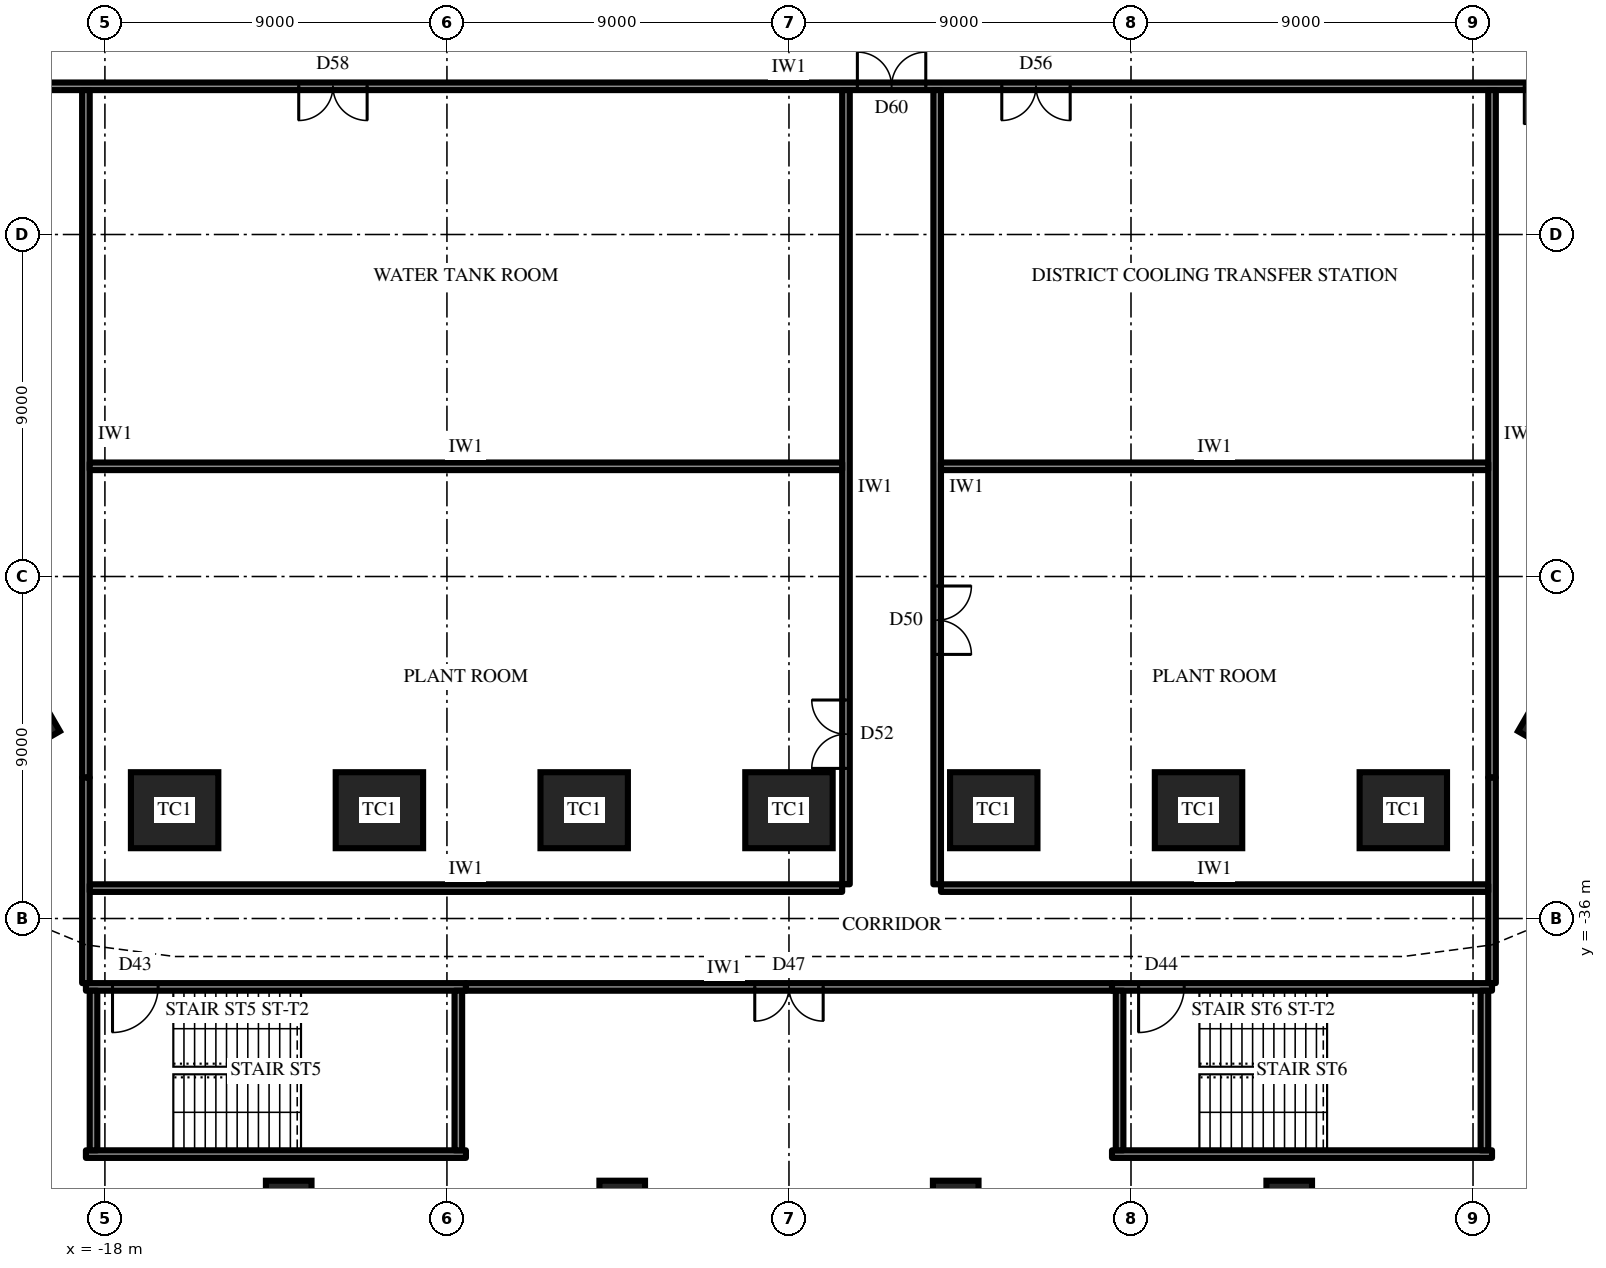
"""IFC4 building model, lengths in metres.
Left out: names, types, materials, properties, quantities, classifications, styles, units other than length and angle.
Written with IfcOpenShell. Run it as: python <this file> out.ifc"""

import sys

from ifc_helpers import new_model, si_unit, direction, frame, frame_2d, origin, origin_2d, place, context, subcontext, project, spatial, rectangle, extrude, element, fill, save


model = new_model("IFC4")
c1 = context("Model", 3, precision=1e-05, world=origin(), true_north=direction((0.0, 1.0)))
c2 = subcontext(c1, "Body", "Model", "MODEL_VIEW")
j1 = project(units=[si_unit("LENGTHUNIT", "METRE"), si_unit("PLANEANGLEUNIT", "RADIAN")], contexts=[c1])
p1 = place(None, origin())
s1 = spatial("IfcSite", under=j1, at=p1, CompositionType="ELEMENT")
p2 = place(p1, origin())
s2 = spatial("IfcBuilding", under=s1, at=p2, CompositionType="ELEMENT")
p3 = place(p2, frame((0.0, 0.0, -9.0)))
s3 = spatial("IfcBuildingStorey", under=s2, at=p3, CompositionType="ELEMENT", Elevation=-9.0)
for number, where, z_axis, x_axis in (
    (1, (-20.626, -30.575, 0.0), (0.0, 0.0, 1.0), (0.5, -0.866, 0.0)),
    (2, (-16.166, -33.15, 0.0), (0.0, 0.0, 1.0), (1.0, 0.0, 0.0)),
    (3, (-10.777, -33.15, 0.0), (0.0, 0.0, 1.0), (1.0, 0.0, 0.0)),
    (4, (-5.389, -33.15, 0.0), (0.0, 0.0, 1.0), (1.0, 0.0, 0.0)),
    (5, (0.0, -33.15, 0.0), (0.0, 0.0, 1.0), (1.0, 0.0, 0.0)),
    (6, (5.389, -33.15, 0.0), (0.0, 0.0, 1.0), (1.0, 0.0, 0.0)),
    (7, (10.777, -33.15, 0.0), (0.0, 0.0, 1.0), (1.0, 0.0, 0.0)),
    (8, (16.166, -33.15, 0.0), (0.0, 0.0, 1.0), (1.0, 0.0, 0.0)),
    (9, (20.626, -30.575, 0.0), (0.0, 0.0, 1.0), (0.5, 0.866, 0.0)),
):
    element("IfcColumn", number, at=place(p3, frame(where, z_axis=z_axis, x_axis=x_axis)), inside=s3, PredefinedType="COLUMN", context=c2, shape_type="SweptSolid", body=[
        extrude(rectangle(XDim=2.3, YDim=2.0, at=origin_2d()), origin(), (0.0, 0.0, 1.0), 4.5),
    ])
p4 = place(p3, frame((-18.5, -42.2, 0.0), z_axis=(0.0, 0.0, 1.0), x_axis=(1.0, 0.0, 0.0)))
e10 = element("IfcWall", 10, at=p4, inside=s3, PredefinedType="SHEAR", context=c2, shape_type="SweptSolid", body=[
    extrude(rectangle(XDim=10.0, YDim=0.2, at=frame_2d((5.0, 0.0))), origin(), (0.0, 0.0, 1.0), 4.5),
])
p5 = place(p3, frame((-8.5, -37.8, 0.0), z_axis=(0.0, 0.0, 1.0), x_axis=(-1.0, 0.0, 0.0)))
e11 = element("IfcWall", 11, at=p5, inside=s3, PredefinedType="SHEAR", context=c2, shape_type="SweptSolid", body=[
    extrude(rectangle(XDim=10.0, YDim=0.2, at=frame_2d((5.0, 0.0))), origin(), (0.0, 0.0, 1.0), 4.5),
])
p6 = place(p5, frame((8.1, 0.0, 0.0)))
e12 = element("IfcOpeningElement", 12, at=p6, cuts=e11, PredefinedType="OPENING", context=c2, shape_type="SweptSolid", body=[
    extrude(rectangle(XDim=1.2, YDim=2.2, at=frame_2d((0.6, 1.1))), frame((0.0, 0.11, 0.0), z_axis=(0.0, -1.0, 0.0), x_axis=(1.0, 0.0, 0.0)), (0.0, 0.0, 1.0), 0.22),
])
for number, where, z_axis, x_axis in (
    (13, (-18.3, -37.9, 0.0), (0.0, 0.0, 1.0), (0.0, -1.0, 0.0)),
    (14, (-8.7, -42.1, 0.0), (0.0, 0.0, 1.0), (0.0, 1.0, 0.0)),
):
    element("IfcWall", number, at=place(p3, frame(where, z_axis=z_axis, x_axis=x_axis)), inside=s3, PredefinedType="SHEAR", context=c2, shape_type="SweptSolid", body=[
        extrude(rectangle(XDim=4.2, YDim=0.2, at=frame_2d((2.1, 0.0))), origin(), (0.0, 0.0, 1.0), 4.5),
    ])
p7 = place(p3, frame((8.5, -42.2, 0.0), z_axis=(0.0, 0.0, 1.0), x_axis=(1.0, 0.0, 0.0)))
e15 = element("IfcWall", 15, at=p7, inside=s3, PredefinedType="SHEAR", context=c2, shape_type="SweptSolid", body=[
    extrude(rectangle(XDim=10.0, YDim=0.2, at=frame_2d((5.0, 0.0))), origin(), (0.0, 0.0, 1.0), 4.5),
])
p8 = place(p3, frame((18.5, -37.8, 0.0), z_axis=(0.0, 0.0, 1.0), x_axis=(-1.0, 0.0, 0.0)))
e16 = element("IfcWall", 16, at=p8, inside=s3, PredefinedType="SHEAR", context=c2, shape_type="SweptSolid", body=[
    extrude(rectangle(XDim=10.0, YDim=0.2, at=frame_2d((5.0, 0.0))), origin(), (0.0, 0.0, 1.0), 4.5),
])
p9 = place(p8, frame((8.1, 0.0, 0.0)))
e17 = element("IfcOpeningElement", 17, at=p9, cuts=e16, PredefinedType="OPENING", context=c2, shape_type="SweptSolid", body=[
    extrude(rectangle(XDim=1.2, YDim=2.2, at=frame_2d((0.6, 1.1))), frame((0.0, 0.11, 0.0), z_axis=(0.0, -1.0, 0.0), x_axis=(1.0, 0.0, 0.0)), (0.0, 0.0, 1.0), 0.22),
])
for number, where, z_axis, x_axis in (
    (18, (8.7, -37.9, 0.0), (0.0, 0.0, 1.0), (0.0, -1.0, 0.0)),
    (19, (18.3, -42.1, 0.0), (0.0, 0.0, 1.0), (0.0, 1.0, 0.0)),
):
    element("IfcWall", number, at=place(p3, frame(where, z_axis=z_axis, x_axis=x_axis)), inside=s3, PredefinedType="SHEAR", context=c2, shape_type="SweptSolid", body=[
        extrude(rectangle(XDim=4.2, YDim=0.2, at=frame_2d((2.1, 0.0))), origin(), (0.0, 0.0, 1.0), 4.5),
    ])
for number, where, z_axis, x_axis in (
    (20, (-13.164, -43.5, 0.0), (0.0, 0.0, 1.0), (1.0, 0.0, 0.0)),
    (21, (-4.388, -43.5, 0.0), (0.0, 0.0, 1.0), (1.0, 0.0, 0.0)),
    (22, (4.388, -43.5, 0.0), (0.0, 0.0, 1.0), (1.0, 0.0, 0.0)),
    (23, (13.164, -43.5, 0.0), (0.0, 0.0, 1.0), (1.0, 0.0, 0.0)),
):
    element("IfcColumn", number, at=place(p3, frame(where, z_axis=z_axis, x_axis=x_axis)), inside=s3, PredefinedType="COLUMN", context=c2, shape_type="SweptSolid", body=[
        extrude(rectangle(XDim=1.2, YDim=1.2, at=origin_2d()), origin(), (0.0, 0.0, 1.0), 4.5),
    ])
p10 = place(p3, frame((-44.283, -14.1, 0.0), z_axis=(0.0, 0.0, 1.0), x_axis=(1.0, 0.0, 0.0)))
e24 = element("IfcWall", 24, at=p10, inside=s3, PredefinedType="PARTITIONING", context=c2, shape_type="SweptSolid", body=[
    extrude(rectangle(XDim=88.565, YDim=0.2, at=frame_2d((44.283, 0.0))), origin(), (0.0, 0.0, 1.0), 4.15),
])
p11 = place(p10, frame((31.383, 0.0, 0.0)))
e25 = element("IfcOpeningElement", 25, at=p11, cuts=e24, PredefinedType="OPENING", context=c2, shape_type="SweptSolid", body=[
    extrude(rectangle(XDim=1.8, YDim=2.4, at=frame_2d((0.9, 1.2))), frame((0.0, 0.11, 0.0), z_axis=(0.0, -1.0, 0.0), x_axis=(1.0, 0.0, 0.0)), (0.0, 0.0, 1.0), 0.22),
])
p12 = place(p10, frame((49.883, 0.0, 0.0)))
e26 = element("IfcOpeningElement", 26, at=p12, cuts=e24, PredefinedType="OPENING", context=c2, shape_type="SweptSolid", body=[
    extrude(rectangle(XDim=1.8, YDim=2.4, at=frame_2d((0.9, 1.2))), frame((0.0, 0.11, 0.0), z_axis=(0.0, -1.0, 0.0), x_axis=(1.0, 0.0, 0.0)), (0.0, 0.0, 1.0), 0.22),
])
p13 = place(p10, frame((46.083, 0.0, 0.0)))
e27 = element("IfcOpeningElement", 27, at=p13, cuts=e24, PredefinedType="OPENING", context=c2, shape_type="SweptSolid", body=[
    extrude(rectangle(XDim=1.8, YDim=2.4, at=frame_2d((0.9, 1.2))), frame((0.0, 0.11, 0.0), z_axis=(0.0, -1.0, 0.0), x_axis=(1.0, 0.0, 0.0)), (0.0, 0.0, 1.0), 0.22),
])
p14 = place(p10, frame((63.633, 0.0, 0.0)))
e28 = element("IfcOpeningElement", 28, at=p14, cuts=e24, PredefinedType="OPENING", context=c2, shape_type="SweptSolid", body=[
    extrude(rectangle(XDim=1.0, YDim=2.2, at=frame_2d((0.5, 1.1))), frame((0.0, 0.11, 0.0), z_axis=(0.0, -1.0, 0.0), x_axis=(1.0, 0.0, 0.0)), (0.0, 0.0, 1.0), 0.22),
])
p15 = place(p3, frame((-18.5, -14.2, 0.0), z_axis=(0.0, 0.0, 1.0), x_axis=(0.0, -1.0, 0.0)))
e29 = element("IfcWall", 29, at=p15, inside=s3, PredefinedType="PARTITIONING", context=c2, shape_type="SweptSolid", body=[
    extrude(rectangle(XDim=18.09, YDim=0.2, at=frame_2d((9.045, 0.0))), origin(), (0.0, 0.0, 1.0), 3.094),
])
p16 = place(p3, frame((-18.5, -32.29, 0.0), z_axis=(0.0, 0.0, 1.0), x_axis=(0.0, -1.0, 0.0)))
e30 = element("IfcWall", 30, at=p16, inside=s3, PredefinedType="PARTITIONING", context=c2, shape_type="SweptSolid", body=[
    extrude(rectangle(XDim=5.41, YDim=0.2, at=frame_2d((2.705, 0.0))), origin(), (0.0, 0.0, 1.0), 4.15),
])
p17 = place(p3, frame((18.5, -14.2, 0.0), z_axis=(0.0, 0.0, 1.0), x_axis=(0.0, -1.0, 0.0)))
e31 = element("IfcWall", 31, at=p17, inside=s3, PredefinedType="PARTITIONING", context=c2, shape_type="SweptSolid", body=[
    extrude(rectangle(XDim=18.09, YDim=0.2, at=frame_2d((9.045, 0.0))), origin(), (0.0, 0.0, 1.0), 3.094),
])
p18 = place(p3, frame((18.5, -32.29, 0.0), z_axis=(0.0, 0.0, 1.0), x_axis=(0.0, -1.0, 0.0)))
e32 = element("IfcWall", 32, at=p18, inside=s3, PredefinedType="PARTITIONING", context=c2, shape_type="SweptSolid", body=[
    extrude(rectangle(XDim=5.41, YDim=0.2, at=frame_2d((2.705, 0.0))), origin(), (0.0, 0.0, 1.0), 4.15),
])
p19 = place(p3, frame((1.5, -14.2, 0.0), z_axis=(0.0, 0.0, 1.0), x_axis=(0.0, -1.0, 0.0)))
e33 = element("IfcWall", 33, at=p19, inside=s3, PredefinedType="PARTITIONING", context=c2, shape_type="SweptSolid", body=[
    extrude(rectangle(XDim=20.9, YDim=0.2, at=frame_2d((10.45, 0.0))), origin(), (0.0, 0.0, 1.0), 4.15),
])
p20 = place(p19, frame((16.05, 0.0, 0.0)))
e34 = element("IfcOpeningElement", 34, at=p20, cuts=e33, PredefinedType="OPENING", context=c2, shape_type="SweptSolid", body=[
    extrude(rectangle(XDim=1.8, YDim=2.4, at=frame_2d((0.9, 1.2))), frame((0.0, 0.11, 0.0), z_axis=(0.0, -1.0, 0.0), x_axis=(1.0, 0.0, 0.0)), (0.0, 0.0, 1.0), 0.22),
])
p21 = place(p3, frame((3.9, -14.2, 0.0), z_axis=(0.0, 0.0, 1.0), x_axis=(0.0, -1.0, 0.0)))
e35 = element("IfcWall", 35, at=p21, inside=s3, PredefinedType="PARTITIONING", context=c2, shape_type="SweptSolid", body=[
    extrude(rectangle(XDim=20.9, YDim=0.2, at=frame_2d((10.45, 0.0))), origin(), (0.0, 0.0, 1.0), 4.15),
])
p22 = place(p21, frame((13.05, 0.0, 0.0)))
e36 = element("IfcOpeningElement", 36, at=p22, cuts=e35, PredefinedType="OPENING", context=c2, shape_type="SweptSolid", body=[
    extrude(rectangle(XDim=1.8, YDim=2.4, at=frame_2d((0.9, 1.2))), frame((0.0, 0.11, 0.0), z_axis=(0.0, -1.0, 0.0), x_axis=(1.0, 0.0, 0.0)), (0.0, 0.0, 1.0), 0.22),
])
p23 = place(p3, frame((-18.4, -24.1, 0.0), z_axis=(0.0, 0.0, 1.0), x_axis=(1.0, 0.0, 0.0)))
e37 = element("IfcWall", 37, at=p23, inside=s3, PredefinedType="PARTITIONING", context=c2, shape_type="SweptSolid", body=[
    extrude(rectangle(XDim=19.8, YDim=0.2, at=frame_2d((9.9, 0.0))), origin(), (0.0, 0.0, 1.0), 4.15),
])
p24 = place(p3, frame((4.0, -24.1, 0.0), z_axis=(0.0, 0.0, 1.0), x_axis=(1.0, 0.0, 0.0)))
e38 = element("IfcWall", 38, at=p24, inside=s3, PredefinedType="PARTITIONING", context=c2, shape_type="SweptSolid", body=[
    extrude(rectangle(XDim=14.4, YDim=0.2, at=frame_2d((7.2, 0.0))), origin(), (0.0, 0.0, 1.0), 4.15),
])
p25 = place(p3, frame((-18.4, -35.2, 0.0), z_axis=(0.0, 0.0, 1.0), x_axis=(1.0, 0.0, 0.0)))
e39 = element("IfcWall", 39, at=p25, inside=s3, PredefinedType="PARTITIONING", context=c2, shape_type="SweptSolid", body=[
    extrude(rectangle(XDim=19.8, YDim=0.2, at=frame_2d((9.9, 0.0))), origin(), (0.0, 0.0, 1.0), 4.15),
])
p26 = place(p3, frame((4.0, -35.2, 0.0), z_axis=(0.0, 0.0, 1.0), x_axis=(1.0, 0.0, 0.0)))
e40 = element("IfcWall", 40, at=p26, inside=s3, PredefinedType="PARTITIONING", context=c2, shape_type="SweptSolid", body=[
    extrude(rectangle(XDim=14.4, YDim=0.2, at=frame_2d((7.2, 0.0))), origin(), (0.0, 0.0, 1.0), 4.15),
])
p27 = place(p3, frame((-8.5, -37.8, 0.0), z_axis=(0.0, 0.0, 1.0), x_axis=(1.0, 0.0, 0.0)))
e41 = element("IfcWall", 41, at=p27, inside=s3, PredefinedType="PARTITIONING", context=c2, shape_type="SweptSolid", body=[
    extrude(rectangle(XDim=17.0, YDim=0.2, at=frame_2d((8.5, 0.0))), origin(), (0.0, 0.0, 1.0), 4.15),
])
p28 = place(p27, frame((7.6, 0.0, 0.0)))
e42 = element("IfcOpeningElement", 42, at=p28, cuts=e41, PredefinedType="OPENING", context=c2, shape_type="SweptSolid", body=[
    extrude(rectangle(XDim=1.8, YDim=2.4, at=frame_2d((0.9, 1.2))), frame((0.0, 0.11, 0.0), z_axis=(0.0, -1.0, 0.0), x_axis=(1.0, 0.0, 0.0)), (0.0, 0.0, 1.0), 0.22),
])
p29 = place(p11, frame((1.8, 0.0, 0.0), z_axis=(0.0, 0.0, 1.0), x_axis=(-1.0, 0.0, 0.0)))
e43 = element("IfcDoor", 43, at=p29, inside=s3, OperationType="DOUBLE_DOOR_SINGLE_SWING", PredefinedType="DOOR", context=c2, shape_type="SweptSolid", body=[
    extrude(rectangle(XDim=1.8, YDim=2.4, at=frame_2d((0.9, 1.2))), frame((0.0, 0.025, 0.0), z_axis=(0.0, -1.0, 0.0), x_axis=(1.0, 0.0, 0.0)), (0.0, 0.0, 1.0), 0.05),
])
fill(e25, e43)
p30 = place(p12, frame((1.8, 0.0, 0.0), z_axis=(0.0, 0.0, 1.0), x_axis=(-1.0, 0.0, 0.0)))
e44 = element("IfcDoor", 44, at=p30, inside=s3, OperationType="DOUBLE_DOOR_SINGLE_SWING", PredefinedType="DOOR", context=c2, shape_type="SweptSolid", body=[
    extrude(rectangle(XDim=1.8, YDim=2.4, at=frame_2d((0.9, 1.2))), frame((0.0, 0.025, 0.0), z_axis=(0.0, -1.0, 0.0), x_axis=(1.0, 0.0, 0.0)), (0.0, 0.0, 1.0), 0.05),
])
fill(e26, e44)
p31 = place(p13, origin())
e45 = element("IfcDoor", 45, at=p31, inside=s3, OperationType="DOUBLE_DOOR_SINGLE_SWING", PredefinedType="DOOR", context=c2, shape_type="SweptSolid", body=[
    extrude(rectangle(XDim=1.8, YDim=2.4, at=frame_2d((0.9, 1.2))), frame((0.0, 0.025, 0.0), z_axis=(0.0, -1.0, 0.0), x_axis=(1.0, 0.0, 0.0)), (0.0, 0.0, 1.0), 0.05),
])
fill(e27, e45)
p32 = place(p20, frame((1.8, 0.0, 0.0), z_axis=(0.0, 0.0, 1.0), x_axis=(-1.0, 0.0, 0.0)))
e46 = element("IfcDoor", 46, at=p32, inside=s3, OperationType="DOUBLE_DOOR_SINGLE_SWING", PredefinedType="DOOR", context=c2, shape_type="SweptSolid", body=[
    extrude(rectangle(XDim=1.8, YDim=2.4, at=frame_2d((0.9, 1.2))), frame((0.0, 0.025, 0.0), z_axis=(0.0, -1.0, 0.0), x_axis=(1.0, 0.0, 0.0)), (0.0, 0.0, 1.0), 0.05),
])
fill(e34, e46)
p33 = place(p22, origin())
e47 = element("IfcDoor", 47, at=p33, inside=s3, OperationType="DOUBLE_DOOR_SINGLE_SWING", PredefinedType="DOOR", context=c2, shape_type="SweptSolid", body=[
    extrude(rectangle(XDim=1.8, YDim=2.4, at=frame_2d((0.9, 1.2))), frame((0.0, 0.025, 0.0), z_axis=(0.0, -1.0, 0.0), x_axis=(1.0, 0.0, 0.0)), (0.0, 0.0, 1.0), 0.05),
])
fill(e36, e47)
p34 = place(p28, frame((1.8, 0.0, 0.0), z_axis=(0.0, 0.0, 1.0), x_axis=(-1.0, 0.0, 0.0)))
e48 = element("IfcDoor", 48, at=p34, inside=s3, OperationType="DOUBLE_DOOR_SINGLE_SWING", PredefinedType="DOOR", context=c2, shape_type="SweptSolid", body=[
    extrude(rectangle(XDim=1.8, YDim=2.4, at=frame_2d((0.9, 1.2))), frame((0.0, 0.025, 0.0), z_axis=(0.0, -1.0, 0.0), x_axis=(1.0, 0.0, 0.0)), (0.0, 0.0, 1.0), 0.05),
])
fill(e42, e48)
p35 = place(p14, frame((1.0, 0.0, 0.0), z_axis=(0.0, 0.0, 1.0), x_axis=(-1.0, 0.0, 0.0)))
e49 = element("IfcDoor", 49, at=p35, inside=s3, OperationType="SINGLE_SWING_LEFT", PredefinedType="DOOR", context=c2, shape_type="SweptSolid", body=[
    extrude(rectangle(XDim=1.0, YDim=2.2, at=frame_2d((0.5, 1.1))), frame((0.0, 0.025, 0.0), z_axis=(0.0, -1.0, 0.0), x_axis=(1.0, 0.0, 0.0)), (0.0, 0.0, 1.0), 0.05),
])
fill(e28, e49)
p36 = place(p6, origin())
e50 = element("IfcDoor", 50, at=p36, inside=s3, OperationType="SINGLE_SWING_LEFT", PredefinedType="DOOR", context=c2, shape_type="SweptSolid", body=[
    extrude(rectangle(XDim=1.2, YDim=2.2, at=frame_2d((0.6, 1.1))), frame((0.0, 0.025, 0.0), z_axis=(0.0, -1.0, 0.0), x_axis=(1.0, 0.0, 0.0)), (0.0, 0.0, 1.0), 0.05),
])
fill(e12, e50)
p37 = place(p9, origin())
e51 = element("IfcDoor", 51, at=p37, inside=s3, OperationType="SINGLE_SWING_LEFT", PredefinedType="DOOR", context=c2, shape_type="SweptSolid", body=[
    extrude(rectangle(XDim=1.2, YDim=2.2, at=frame_2d((0.6, 1.1))), frame((0.0, 0.025, 0.0), z_axis=(0.0, -1.0, 0.0), x_axis=(1.0, 0.0, 0.0)), (0.0, 0.0, 1.0), 0.05),
])
fill(e17, e51)
save(model, sys.argv[1])
